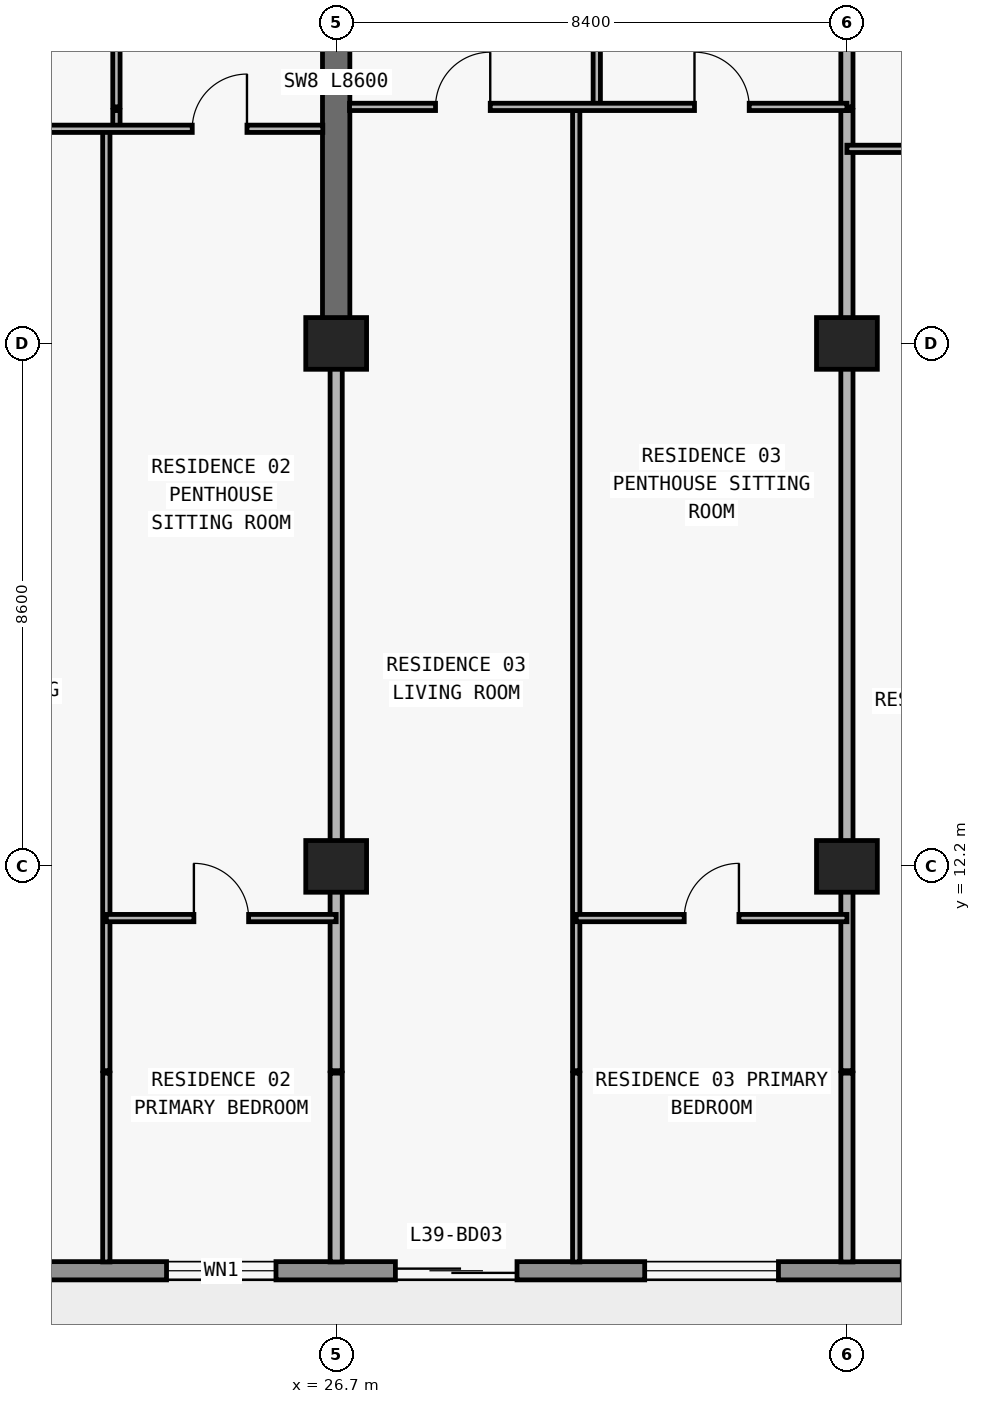
"""IFC4 building model, lengths in metres.
Left out: names, types, materials, properties, quantities, classifications, styles, units other than length and angle.
Written with IfcOpenShell. Run it as: python <this file> out.ifc"""

import sys

from ifc_helpers import new_model, si_unit, direction, frame, frame_2d, origin, origin_2d, place, context, subcontext, project, spatial, rectangle, extrude, element, fill, save


model = new_model("IFC4")
c1 = context("Model", 3, precision=1e-05, world=origin(), true_north=direction((0.0, 1.0)))
c2 = subcontext(c1, "Body", "Model", "MODEL_VIEW")
j1 = project(units=[si_unit("LENGTHUNIT", "METRE"), si_unit("PLANEANGLEUNIT", "RADIAN")], contexts=[c1])
p1 = place(None, origin())
s1 = spatial("IfcSite", under=j1, at=p1, CompositionType="ELEMENT")
p2 = place(p1, origin())
s2 = spatial("IfcBuilding", under=s1, at=p2, CompositionType="ELEMENT")
p3 = place(p2, frame((0.0, 0.0, 142.2)))
s3 = spatial("IfcBuildingStorey", under=s2, at=p3, CompositionType="ELEMENT", Elevation=142.2)
for number, where, z_axis, x_axis in (
    (1, (26.7, 12.2, 0.0), (0.0, 0.0, 1.0), (1.0, 0.0, 0.0)),
    (2, (35.1, 12.2, 0.0), (0.0, 0.0, 1.0), (1.0, 0.0, 0.0)),
    (3, (26.7, 20.8, 0.0), (0.0, 0.0, 1.0), (1.0, 0.0, 0.0)),
    (4, (35.1, 20.8, 0.0), (0.0, 0.0, 1.0), (1.0, 0.0, 0.0)),
):
    element("IfcColumn", number, at=place(p3, frame(where, z_axis=z_axis, x_axis=x_axis)), inside=s3, PredefinedType="COLUMN", context=c2, shape_type="SweptSolid", body=[
        extrude(rectangle(XDim=1.0, YDim=0.85, at=origin_2d()), origin(), (0.0, 0.0, 1.0), 3.05),
    ])
p4 = place(p3, frame((26.7, 20.8, 0.0), z_axis=(0.0, 0.0, 1.0), x_axis=(0.0, 1.0, 0.0)))
e5 = element("IfcWall", 5, at=p4, inside=s3, PredefinedType="SHEAR", context=c2, shape_type="SweptSolid", body=[
    extrude(rectangle(XDim=8.6, YDim=0.45, at=frame_2d((4.3, 0.0))), origin(), (0.0, 0.0, 1.0), 3.05),
])
p5 = place(p3, frame((70.1, 5.55, 0.0), z_axis=(0.0, 0.0, 1.0), x_axis=(-1.0, 0.0, 0.0)))
e6 = element("IfcWall", 6, at=p5, inside=s3, PredefinedType="STANDARD", context=c2, shape_type="SweptSolid", body=[
    extrude(rectangle(XDim=62.4, YDim=0.3, at=frame_2d((31.2, 0.0))), origin(), (0.0, 0.0, 1.0), 3.05),
])
p6 = place(p5, frame((57.226, 0.0, 0.0)))
e7 = element("IfcOpeningElement", 7, at=p6, cuts=e6, PredefinedType="OPENING", context=c2, shape_type="SweptSolid", body=[
    extrude(rectangle(XDim=2.0, YDim=2.3, at=frame_2d((1.0, 1.15))), frame((0.0, 0.16, 0.0), z_axis=(0.0, -1.0, 0.0), x_axis=(1.0, 0.0, 0.0)), (0.0, 0.0, 1.0), 0.32),
])
p7 = place(p5, frame((52.926, 0.0, 0.85)))
e8 = element("IfcOpeningElement", 8, at=p7, cuts=e6, PredefinedType="OPENING", context=c2, shape_type="SweptSolid", body=[
    extrude(rectangle(XDim=2.2, YDim=1.55, at=frame_2d((1.1, 0.775))), frame((0.0, 0.16, 0.0), z_axis=(0.0, -1.0, 0.0), x_axis=(1.0, 0.0, 0.0)), (0.0, 0.0, 1.0), 0.32),
])
p8 = place(p5, frame((48.49, 0.0, 0.0)))
e9 = element("IfcOpeningElement", 9, at=p8, cuts=e6, PredefinedType="OPENING", context=c2, shape_type="SweptSolid", body=[
    extrude(rectangle(XDim=2.0, YDim=2.3, at=frame_2d((1.0, 1.15))), frame((0.0, 0.16, 0.0), z_axis=(0.0, -1.0, 0.0), x_axis=(1.0, 0.0, 0.0)), (0.0, 0.0, 1.0), 0.32),
])
p9 = place(p5, frame((44.39, 0.0, 0.85)))
e10 = element("IfcOpeningElement", 10, at=p9, cuts=e6, PredefinedType="OPENING", context=c2, shape_type="SweptSolid", body=[
    extrude(rectangle(XDim=1.8, YDim=1.55, at=frame_2d((0.9, 0.775))), frame((0.0, 0.16, 0.0), z_axis=(0.0, -1.0, 0.0), x_axis=(1.0, 0.0, 0.0)), (0.0, 0.0, 1.0), 0.32),
])
p10 = place(p5, frame((40.426, 0.0, 0.0)))
e11 = element("IfcOpeningElement", 11, at=p10, cuts=e6, PredefinedType="OPENING", context=c2, shape_type="SweptSolid", body=[
    extrude(rectangle(XDim=2.0, YDim=2.3, at=frame_2d((1.0, 1.15))), frame((0.0, 0.16, 0.0), z_axis=(0.0, -1.0, 0.0), x_axis=(1.0, 0.0, 0.0)), (0.0, 0.0, 1.0), 0.32),
])
p11 = place(p5, frame((36.126, 0.0, 0.85)))
e12 = element("IfcOpeningElement", 12, at=p11, cuts=e6, PredefinedType="OPENING", context=c2, shape_type="SweptSolid", body=[
    extrude(rectangle(XDim=2.2, YDim=1.55, at=frame_2d((1.1, 0.775))), frame((0.0, 0.16, 0.0), z_axis=(0.0, -1.0, 0.0), x_axis=(1.0, 0.0, 0.0)), (0.0, 0.0, 1.0), 0.32),
])
p12 = place(p5, frame((32.09, 0.0, 0.0)))
e13 = element("IfcOpeningElement", 13, at=p12, cuts=e6, PredefinedType="OPENING", context=c2, shape_type="SweptSolid", body=[
    extrude(rectangle(XDim=2.0, YDim=2.3, at=frame_2d((1.0, 1.15))), frame((0.0, 0.16, 0.0), z_axis=(0.0, -1.0, 0.0), x_axis=(1.0, 0.0, 0.0)), (0.0, 0.0, 1.0), 0.32),
])
p13 = place(p5, frame((28.21, 0.0, 0.65)))
e14 = element("IfcOpeningElement", 14, at=p13, cuts=e6, PredefinedType="OPENING", context=c2, shape_type="SweptSolid", body=[
    extrude(rectangle(XDim=2.6, YDim=1.85, at=frame_2d((1.3, 0.925))), frame((0.0, 0.16, 0.0), z_axis=(0.0, -1.0, 0.0), x_axis=(1.0, 0.0, 0.0)), (0.0, 0.0, 1.0), 0.32),
])
p14 = place(p5, frame((22.1, 0.0, 0.85)))
e15 = element("IfcOpeningElement", 15, at=p14, cuts=e6, PredefinedType="OPENING", context=c2, shape_type="SweptSolid", body=[
    extrude(rectangle(XDim=2.2, YDim=1.55, at=frame_2d((1.1, 0.775))), frame((0.0, 0.16, 0.0), z_axis=(0.0, -1.0, 0.0), x_axis=(1.0, 0.0, 0.0)), (0.0, 0.0, 1.0), 0.32),
])
p15 = place(p5, frame((16.09, 0.0, 0.0)))
e16 = element("IfcOpeningElement", 16, at=p15, cuts=e6, PredefinedType="OPENING", context=c2, shape_type="SweptSolid", body=[
    extrude(rectangle(XDim=2.0, YDim=2.3, at=frame_2d((1.0, 1.15))), frame((0.0, 0.16, 0.0), z_axis=(0.0, -1.0, 0.0), x_axis=(1.0, 0.0, 0.0)), (0.0, 0.0, 1.0), 0.32),
])
p16 = place(p5, frame((11.41, 0.0, 0.65)))
e17 = element("IfcOpeningElement", 17, at=p16, cuts=e6, PredefinedType="OPENING", context=c2, shape_type="SweptSolid", body=[
    extrude(rectangle(XDim=2.6, YDim=1.85, at=frame_2d((1.3, 0.925))), frame((0.0, 0.16, 0.0), z_axis=(0.0, -1.0, 0.0), x_axis=(1.0, 0.0, 0.0)), (0.0, 0.0, 1.0), 0.32),
])
p17 = place(p5, frame((5.3, 0.0, 0.85)))
e18 = element("IfcOpeningElement", 18, at=p17, cuts=e6, PredefinedType="OPENING", context=c2, shape_type="SweptSolid", body=[
    extrude(rectangle(XDim=2.2, YDim=1.55, at=frame_2d((1.1, 0.775))), frame((0.0, 0.16, 0.0), z_axis=(0.0, -1.0, 0.0), x_axis=(1.0, 0.0, 0.0)), (0.0, 0.0, 1.0), 0.32),
])
p18 = place(p3, frame((22.92, 5.695, 0.0), z_axis=(0.0, 0.0, 1.0), x_axis=(0.0, 1.0, 0.0)))
e19 = element("IfcWall", 19, at=p18, inside=s3, PredefinedType="PARTITIONING", context=c2, shape_type="SweptSolid", body=[
    extrude(rectangle(XDim=3.105, YDim=0.12, at=frame_2d((1.552, 0.0))), origin(), (0.0, 0.0, 1.0), 3.05),
])
p19 = place(p3, frame((22.92, 8.84, 0.0), z_axis=(0.0, 0.0, 1.0), x_axis=(0.0, 1.0, 0.0)))
e20 = element("IfcWall", 20, at=p19, inside=s3, PredefinedType="PARTITIONING", context=c2, shape_type="SweptSolid", body=[
    extrude(rectangle(XDim=15.49, YDim=0.12, at=frame_2d((7.745, 0.0))), origin(), (0.0, 0.0, 1.0), 3.05),
])
p20 = place(p3, frame((23.086, 24.335, 0.0), z_axis=(0.0, 0.0, 1.0), x_axis=(0.0, 1.0, 0.0)))
e21 = element("IfcWall", 21, at=p20, inside=s3, PredefinedType="PARTITIONING", context=c2, shape_type="SweptSolid", body=[
    extrude(rectangle(XDim=0.295, YDim=0.12, at=frame_2d((0.147, 0.0))), origin(), (0.0, 0.0, 1.0), 3.05),
])
p21 = place(p3, frame((23.086, 24.69, 0.0), z_axis=(0.0, 0.0, 1.0), x_axis=(0.0, 1.0, 0.0)))
e22 = element("IfcWall", 22, at=p21, inside=s3, PredefinedType="PARTITIONING", context=c2, shape_type="SweptSolid", body=[
    extrude(rectangle(XDim=4.79, YDim=0.12, at=frame_2d((2.395, 0.0))), origin(), (0.0, 0.0, 1.0), 3.05),
])
p22 = place(p21, frame((1.945, 0.0, 0.0)))
e23 = element("IfcOpeningElement", 23, at=p22, cuts=e22, PredefinedType="OPENING", context=c2, shape_type="SweptSolid", body=[
    extrude(rectangle(XDim=0.9, YDim=2.15, at=frame_2d((0.45, 1.075))), frame((0.0, 0.07, 0.0), z_axis=(0.0, -1.0, 0.0), x_axis=(1.0, 0.0, 0.0)), (0.0, 0.0, 1.0), 0.14),
])
p23 = place(p3, frame((26.7, 5.695, 0.0), z_axis=(0.0, 0.0, 1.0), x_axis=(0.0, 1.0, 0.0)))
e24 = element("IfcWall", 24, at=p23, inside=s3, PredefinedType="PARTITIONING", context=c2, shape_type="SweptSolid", body=[
    extrude(rectangle(XDim=3.105, YDim=0.2, at=frame_2d((1.552, 0.0))), origin(), (0.0, 0.0, 1.0), 3.05),
])
p24 = place(p3, frame((26.7, 8.84, 0.0), z_axis=(0.0, 0.0, 1.0), x_axis=(0.0, 1.0, 0.0)))
e25 = element("IfcWall", 25, at=p24, inside=s3, PredefinedType="PARTITIONING", context=c2, shape_type="SweptSolid", body=[
    extrude(rectangle(XDim=11.955, YDim=0.2, at=frame_2d((5.978, 0.0))), origin(), (0.0, 0.0, 1.0), 2.174),
])
p25 = place(p3, frame((30.648, 5.695, 0.0), z_axis=(0.0, 0.0, 1.0), x_axis=(0.0, 1.0, 0.0)))
e26 = element("IfcWall", 26, at=p25, inside=s3, PredefinedType="PARTITIONING", context=c2, shape_type="SweptSolid", body=[
    extrude(rectangle(XDim=3.105, YDim=0.12, at=frame_2d((1.552, 0.0))), origin(), (0.0, 0.0, 1.0), 3.05),
])
p26 = place(p3, frame((30.648, 8.84, 0.0), z_axis=(0.0, 0.0, 1.0), x_axis=(0.0, 1.0, 0.0)))
e27 = element("IfcWall", 27, at=p26, inside=s3, PredefinedType="PARTITIONING", context=c2, shape_type="SweptSolid", body=[
    extrude(rectangle(XDim=15.79, YDim=0.12, at=frame_2d((7.895, 0.0))), origin(), (0.0, 0.0, 1.0), 3.05),
])
p27 = place(p3, frame((30.986, 24.69, 0.0), z_axis=(0.0, 0.0, 1.0), x_axis=(0.0, 1.0, 0.0)))
e28 = element("IfcWall", 28, at=p27, inside=s3, PredefinedType="PARTITIONING", context=c2, shape_type="SweptSolid", body=[
    extrude(rectangle(XDim=5.09, YDim=0.12, at=frame_2d((2.545, 0.0))), origin(), (0.0, 0.0, 1.0), 2.725),
])
p28 = place(p27, frame((2.095, 0.0, 0.0)))
e29 = element("IfcOpeningElement", 29, at=p28, cuts=e28, PredefinedType="OPENING", context=c2, shape_type="SweptSolid", body=[
    extrude(rectangle(XDim=0.9, YDim=2.15, at=frame_2d((0.45, 1.075))), frame((0.0, 0.07, 0.0), z_axis=(0.0, -1.0, 0.0), x_axis=(1.0, 0.0, 0.0)), (0.0, 0.0, 1.0), 0.14),
])
p29 = place(p3, frame((35.1, 5.695, 0.0), z_axis=(0.0, 0.0, 1.0), x_axis=(0.0, 1.0, 0.0)))
e30 = element("IfcWall", 30, at=p29, inside=s3, PredefinedType="PARTITIONING", context=c2, shape_type="SweptSolid", body=[
    extrude(rectangle(XDim=3.105, YDim=0.2, at=frame_2d((1.552, 0.0))), origin(), (0.0, 0.0, 1.0), 3.05),
])
p30 = place(p3, frame((35.1, 8.84, 0.0), z_axis=(0.0, 0.0, 1.0), x_axis=(0.0, 1.0, 0.0)))
e31 = element("IfcWall", 31, at=p30, inside=s3, PredefinedType="PARTITIONING", context=c2, shape_type="SweptSolid", body=[
    extrude(rectangle(XDim=15.79, YDim=0.2, at=frame_2d((7.895, 0.0))), origin(), (0.0, 0.0, 1.0), 2.174),
])
p31 = place(p3, frame((35.1, 24.69, 0.0), z_axis=(0.0, 0.0, 1.0), x_axis=(0.0, 1.0, 0.0)))
e32 = element("IfcWall", 32, at=p31, inside=s3, PredefinedType="PARTITIONING", context=c2, shape_type="SweptSolid", body=[
    extrude(rectangle(XDim=5.09, YDim=0.2, at=frame_2d((2.545, 0.0))), origin(), (0.0, 0.0, 1.0), 2.174),
])
p32 = place(p3, frame((22.92, 11.35, 0.0), z_axis=(0.0, 0.0, 1.0), x_axis=(1.0, 0.0, 0.0)))
e33 = element("IfcWall", 33, at=p32, inside=s3, PredefinedType="PARTITIONING", context=c2, shape_type="SweptSolid", body=[
    extrude(rectangle(XDim=3.78, YDim=0.12, at=frame_2d((1.89, 0.0))), origin(), (0.0, 0.0, 1.0), 3.05),
])
p33 = place(p32, frame((1.44, 0.0, 0.0)))
e34 = element("IfcOpeningElement", 34, at=p33, cuts=e33, PredefinedType="OPENING", context=c2, shape_type="SweptSolid", body=[
    extrude(rectangle(XDim=0.9, YDim=2.15, at=frame_2d((0.45, 1.075))), frame((0.0, 0.07, 0.0), z_axis=(0.0, -1.0, 0.0), x_axis=(1.0, 0.0, 0.0)), (0.0, 0.0, 1.0), 0.14),
])
p34 = place(p3, frame((30.648, 11.35, 0.0), z_axis=(0.0, 0.0, 1.0), x_axis=(1.0, 0.0, 0.0)))
e35 = element("IfcWall", 35, at=p34, inside=s3, PredefinedType="PARTITIONING", context=c2, shape_type="SweptSolid", body=[
    extrude(rectangle(XDim=4.452, YDim=0.12, at=frame_2d((2.226, 0.0))), origin(), (0.0, 0.0, 1.0), 3.05),
])
p35 = place(p34, frame((1.776, 0.0, 0.0)))
e36 = element("IfcOpeningElement", 36, at=p35, cuts=e35, PredefinedType="OPENING", context=c2, shape_type="SweptSolid", body=[
    extrude(rectangle(XDim=0.9, YDim=2.15, at=frame_2d((0.45, 1.075))), frame((0.0, 0.07, 0.0), z_axis=(0.0, -1.0, 0.0), x_axis=(1.0, 0.0, 0.0)), (0.0, 0.0, 1.0), 0.14),
])
p36 = place(p3, frame((35.1, 24.0, 0.0), z_axis=(0.0, 0.0, 1.0), x_axis=(1.0, 0.0, 0.0)))
e37 = element("IfcWall", 37, at=p36, inside=s3, PredefinedType="PARTITIONING", context=c2, shape_type="SweptSolid", body=[
    extrude(rectangle(XDim=7.6, YDim=0.12, at=frame_2d((3.8, 0.0))), origin(), (0.0, 0.0, 1.0), 3.05),
])
p37 = place(p36, frame((3.35, 0.0, 0.0)))
e38 = element("IfcOpeningElement", 38, at=p37, cuts=e37, PredefinedType="OPENING", context=c2, shape_type="SweptSolid", body=[
    extrude(rectangle(XDim=0.9, YDim=2.15, at=frame_2d((0.45, 1.075))), frame((0.0, 0.07, 0.0), z_axis=(0.0, -1.0, 0.0), x_axis=(1.0, 0.0, 0.0)), (0.0, 0.0, 1.0), 0.14),
])
p38 = place(p3, frame((18.3, 24.33, 0.0), z_axis=(0.0, 0.0, 1.0), x_axis=(1.0, 0.0, 0.0)))
e39 = element("IfcWall", 39, at=p38, inside=s3, PredefinedType="PARTITIONING", context=c2, shape_type="SweptSolid", body=[
    extrude(rectangle(XDim=8.18, YDim=0.12, at=frame_2d((4.09, 0.0))), origin(), (0.0, 0.0, 1.0), 3.05),
])
p39 = place(p38, frame((1.86, 0.0, 0.0)))
e40 = element("IfcOpeningElement", 40, at=p39, cuts=e39, PredefinedType="OPENING", context=c2, shape_type="SweptSolid", body=[
    extrude(rectangle(XDim=0.9, YDim=2.15, at=frame_2d((0.45, 1.075))), frame((0.0, 0.07, 0.0), z_axis=(0.0, -1.0, 0.0), x_axis=(1.0, 0.0, 0.0)), (0.0, 0.0, 1.0), 0.14),
])
p40 = place(p38, frame((6.033, 0.0, 0.0)))
e41 = element("IfcOpeningElement", 41, at=p40, cuts=e39, PredefinedType="OPENING", context=c2, shape_type="SweptSolid", body=[
    extrude(rectangle(XDim=0.9, YDim=2.15, at=frame_2d((0.45, 1.075))), frame((0.0, 0.07, 0.0), z_axis=(0.0, -1.0, 0.0), x_axis=(1.0, 0.0, 0.0)), (0.0, 0.0, 1.0), 0.14),
])
p41 = place(p3, frame((26.92, 24.69, 0.0), z_axis=(0.0, 0.0, 1.0), x_axis=(1.0, 0.0, 0.0)))
e42 = element("IfcWall", 42, at=p41, inside=s3, PredefinedType="PARTITIONING", context=c2, shape_type="SweptSolid", body=[
    extrude(rectangle(XDim=8.18, YDim=0.12, at=frame_2d((4.09, 0.0))), origin(), (0.0, 0.0, 1.0), 3.05),
])
p42 = place(p41, frame((1.414, 0.0, 0.0)))
e43 = element("IfcOpeningElement", 43, at=p42, cuts=e42, PredefinedType="OPENING", context=c2, shape_type="SweptSolid", body=[
    extrude(rectangle(XDim=0.9, YDim=2.15, at=frame_2d((0.45, 1.075))), frame((0.0, 0.07, 0.0), z_axis=(0.0, -1.0, 0.0), x_axis=(1.0, 0.0, 0.0)), (0.0, 0.0, 1.0), 0.14),
])
p43 = place(p41, frame((5.673, 0.0, 0.0)))
e44 = element("IfcOpeningElement", 44, at=p43, cuts=e42, PredefinedType="OPENING", context=c2, shape_type="SweptSolid", body=[
    extrude(rectangle(XDim=0.9, YDim=2.15, at=frame_2d((0.45, 1.075))), frame((0.0, 0.07, 0.0), z_axis=(0.0, -1.0, 0.0), x_axis=(1.0, 0.0, 0.0)), (0.0, 0.0, 1.0), 0.14),
])
p44 = place(p9, origin())
e45 = element("IfcWindow", 45, at=p44, inside=s3, PartitioningType="SINGLE_PANEL", PredefinedType="WINDOW", context=c2, shape_type="SweptSolid", body=[
    extrude(rectangle(XDim=1.8, YDim=1.55, at=frame_2d((0.9, 0.775))), frame((0.0, 0.03, 0.0), z_axis=(0.0, -1.0, 0.0), x_axis=(1.0, 0.0, 0.0)), (0.0, 0.0, 1.0), 0.06),
])
fill(e10, e45)
p45 = place(p10, origin())
e46 = element("IfcDoor", 46, at=p45, inside=s3, OperationType="DOUBLE_DOOR_SLIDING", PredefinedType="DOOR", context=c2, shape_type="SweptSolid", body=[
    extrude(rectangle(XDim=2.0, YDim=2.3, at=frame_2d((1.0, 1.15))), frame((0.0, 0.025, 0.0), z_axis=(0.0, -1.0, 0.0), x_axis=(1.0, 0.0, 0.0)), (0.0, 0.0, 1.0), 0.05),
])
fill(e11, e46)
p46 = place(p11, origin())
e47 = element("IfcWindow", 47, at=p46, inside=s3, PartitioningType="SINGLE_PANEL", PredefinedType="WINDOW", context=c2, shape_type="SweptSolid", body=[
    extrude(rectangle(XDim=2.2, YDim=1.55, at=frame_2d((1.1, 0.775))), frame((0.0, 0.03, 0.0), z_axis=(0.0, -1.0, 0.0), x_axis=(1.0, 0.0, 0.0)), (0.0, 0.0, 1.0), 0.06),
])
fill(e12, e47)
p47 = place(p40, origin())
e48 = element("IfcDoor", 48, at=p47, inside=s3, OperationType="SINGLE_SWING_RIGHT", PredefinedType="DOOR", context=c2, shape_type="SweptSolid", body=[
    extrude(rectangle(XDim=0.9, YDim=2.15, at=frame_2d((0.45, 1.075))), frame((0.0, 0.025, 0.0), z_axis=(0.0, -1.0, 0.0), x_axis=(1.0, 0.0, 0.0)), (0.0, 0.0, 1.0), 0.05),
])
fill(e41, e48)
p48 = place(p33, origin())
e49 = element("IfcDoor", 49, at=p48, inside=s3, OperationType="SINGLE_SWING_LEFT", PredefinedType="DOOR", context=c2, shape_type="SweptSolid", body=[
    extrude(rectangle(XDim=0.9, YDim=2.15, at=frame_2d((0.45, 1.075))), frame((0.0, 0.025, 0.0), z_axis=(0.0, -1.0, 0.0), x_axis=(1.0, 0.0, 0.0)), (0.0, 0.0, 1.0), 0.05),
])
fill(e34, e49)
p49 = place(p42, origin())
e50 = element("IfcDoor", 50, at=p49, inside=s3, OperationType="SINGLE_SWING_RIGHT", PredefinedType="DOOR", context=c2, shape_type="SweptSolid", body=[
    extrude(rectangle(XDim=0.9, YDim=2.15, at=frame_2d((0.45, 1.075))), frame((0.0, 0.025, 0.0), z_axis=(0.0, -1.0, 0.0), x_axis=(1.0, 0.0, 0.0)), (0.0, 0.0, 1.0), 0.05),
])
fill(e43, e50)
p50 = place(p43, origin())
e51 = element("IfcDoor", 51, at=p50, inside=s3, OperationType="SINGLE_SWING_LEFT", PredefinedType="DOOR", context=c2, shape_type="SweptSolid", body=[
    extrude(rectangle(XDim=0.9, YDim=2.15, at=frame_2d((0.45, 1.075))), frame((0.0, 0.025, 0.0), z_axis=(0.0, -1.0, 0.0), x_axis=(1.0, 0.0, 0.0)), (0.0, 0.0, 1.0), 0.05),
])
fill(e44, e51)
p51 = place(p35, origin())
e52 = element("IfcDoor", 52, at=p51, inside=s3, OperationType="SINGLE_SWING_RIGHT", PredefinedType="DOOR", context=c2, shape_type="SweptSolid", body=[
    extrude(rectangle(XDim=0.9, YDim=2.15, at=frame_2d((0.45, 1.075))), frame((0.0, 0.025, 0.0), z_axis=(0.0, -1.0, 0.0), x_axis=(1.0, 0.0, 0.0)), (0.0, 0.0, 1.0), 0.05),
])
fill(e36, e52)
save(model, sys.argv[1])
